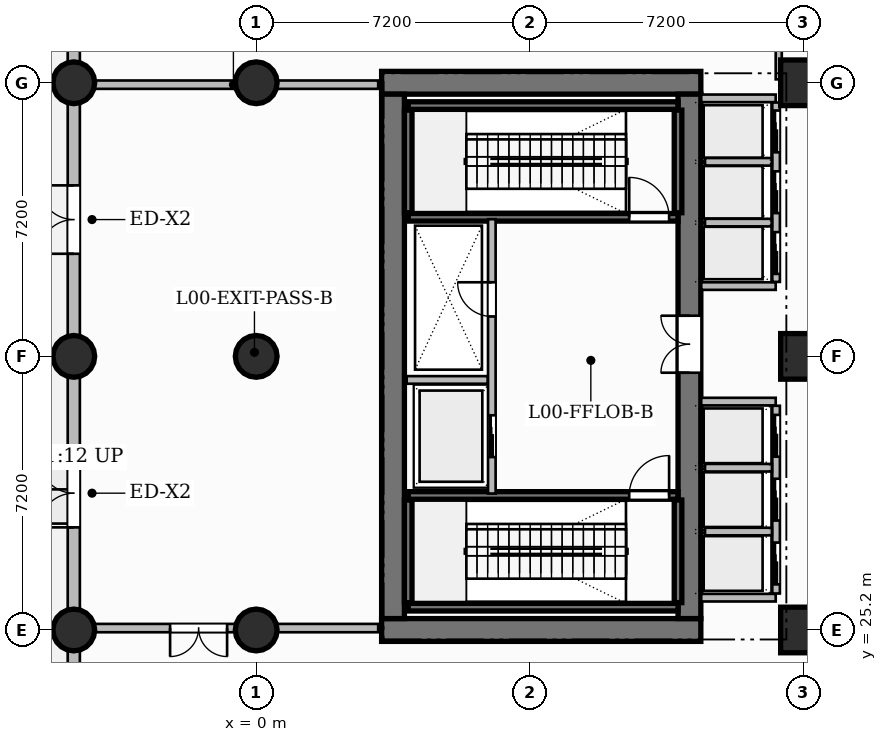
"""IFC4 building model, lengths in metres.
Left out: names, types, materials, properties, quantities, classifications, styles, units other than length and angle.
Written with IfcOpenShell. Run it as: python <this file> out.ifc"""

import sys

from ifc_helpers import new_model, si_unit, direction, frame, frame_2d, origin, origin_2d, place, context, subcontext, project, spatial, rectangle, circle, extrude, source, transform, mapped, element, fill, save


model = new_model("IFC4")
c1 = context("Model", 3, precision=1e-05, world=origin(), true_north=direction((0.0, 1.0)))
c2 = subcontext(c1, "Body", "Model", "MODEL_VIEW")
j1 = project(units=[si_unit("LENGTHUNIT", "METRE"), si_unit("PLANEANGLEUNIT", "RADIAN")], contexts=[c1])
p1 = place(None, origin())
s1 = spatial("IfcSite", under=j1, at=p1, CompositionType="ELEMENT")
p2 = place(p1, origin())
s2 = spatial("IfcBuilding", under=s1, at=p2, CompositionType="ELEMENT")
p3 = place(p2, origin())
s3 = spatial("IfcBuildingStorey", under=s2, at=p3, CompositionType="ELEMENT", Elevation=0.0)
for number, where, z_axis, x_axis in (
    (1, (3.3, 25.2, 0.0), (0.0, 0.0, 1.0), (1.0, 0.0, 0.0)),
    (2, (3.3, 39.6, 0.0), (0.0, 0.0, 1.0), (1.0, 0.0, 0.0)),
):
    element("IfcWall", number, at=place(p3, frame(where, z_axis=z_axis, x_axis=x_axis)), inside=s3, PredefinedType="SHEAR", context=c2, shape_type="SweptSolid", body=[
        extrude(rectangle(XDim=8.4, YDim=0.6, at=frame_2d((4.2, 0.0))), origin(), (0.0, 0.0, 1.0), 5.4),
    ])
p4 = place(p3, frame((3.6, 25.5, 0.0), z_axis=(0.0, 0.0, 1.0), x_axis=(0.0, 1.0, 0.0)))
e3 = element("IfcWall", 3, at=p4, inside=s3, PredefinedType="SHEAR", context=c2, shape_type="SweptSolid", body=[
    extrude(rectangle(XDim=13.8, YDim=0.6, at=frame_2d((6.9, 0.0))), origin(), (0.0, 0.0, 1.0), 5.4),
])
p5 = place(p3, frame((11.4, 25.5, 0.0), z_axis=(0.0, 0.0, 1.0), x_axis=(0.0, 1.0, 0.0)))
e4 = element("IfcWall", 4, at=p5, inside=s3, PredefinedType="SHEAR", context=c2, shape_type="SweptSolid", body=[
    extrude(rectangle(XDim=13.8, YDim=0.6, at=frame_2d((6.9, 0.0))), origin(), (0.0, 0.0, 1.0), 5.4),
])
p6 = place(p5, frame((6.47, 0.0, 0.0)))
e5 = element("IfcOpeningElement", 5, at=p6, cuts=e4, PredefinedType="OPENING", context=c2, shape_type="SweptSolid", body=[
    extrude(rectangle(XDim=1.5, YDim=2.2, at=frame_2d((0.75, 1.1))), frame((0.0, 0.31, 0.0), z_axis=(0.0, -1.0, 0.0), x_axis=(1.0, 0.0, 0.0)), (0.0, 0.0, 1.0), 0.62),
])
m1 = source(origin(), c2, "Body", "SweptSolid", [
    extrude(circle(Radius=0.55, at=origin_2d()), origin(), (0.0, 0.0, 1.0), 5.4),
])
for number, where, z_axis, x_axis in (
    (6, (-4.8, 25.2, 0.0), (0.0, 0.0, 1.0), (1.0, 0.0, 0.0)),
    (7, (-4.8, 32.4, 0.0), (0.0, 0.0, 1.0), (1.0, 0.0, 0.0)),
    (8, (-4.8, 39.6, 0.0), (0.0, 0.0, 1.0), (1.0, 0.0, 0.0)),
    (9, (0.0, 25.2, 0.0), (0.0, 0.0, 1.0), (1.0, 0.0, 0.0)),
    (10, (0.0, 32.4, 0.0), (0.0, 0.0, 1.0), (1.0, 0.0, 0.0)),
    (11, (0.0, 39.6, 0.0), (0.0, 0.0, 1.0), (1.0, 0.0, 0.0)),
):
    element("IfcColumn", number, at=place(p3, frame(where, z_axis=z_axis, x_axis=x_axis)), inside=s3, PredefinedType="COLUMN", context=c2, shape_type="MappedRepresentation", body=[
        mapped(m1, transform((0.0, 0.0, 0.0), scale=1.0)),
    ])
m2 = source(origin(), c2, "Body", "SweptSolid", [
    extrude(rectangle(XDim=1.2, YDim=1.2, at=origin_2d()), origin(), (0.0, 0.0, 1.0), 5.4),
])
for number, where, z_axis, x_axis in (
    (12, (14.4, 25.2, 0.0), (0.0, 0.0, 1.0), (1.0, 0.0, 0.0)),
    (13, (14.4, 32.4, 0.0), (0.0, 0.0, 1.0), (1.0, 0.0, 0.0)),
    (14, (14.4, 39.6, 0.0), (0.0, 0.0, 1.0), (1.0, 0.0, 0.0)),
):
    element("IfcColumn", number, at=place(p3, frame(where, z_axis=z_axis, x_axis=x_axis)), inside=s3, PredefinedType="COLUMN", context=c2, shape_type="MappedRepresentation", body=[
        mapped(m2, transform((0.0, 0.0, 0.0), scale=1.0)),
    ])
p7 = place(p3, frame((4.0, 25.8, 0.0), z_axis=(0.0, 0.0, 1.0), x_axis=(1.0, 0.0, 0.0)))
e15 = element("IfcWall", 15, at=p7, inside=s3, PredefinedType="SHEAR", context=c2, shape_type="SweptSolid", body=[
    extrude(rectangle(XDim=7.1, YDim=0.2, at=frame_2d((3.55, 0.0))), origin(), (0.0, 0.0, 1.0), 5.4),
])
for number, where, z_axis, x_axis in (
    (16, (4.0, 25.92, 0.0), (0.0, 0.0, 1.0), (0.0, 1.0, 0.0)),
    (17, (11.1, 25.92, 0.0), (0.0, 0.0, 1.0), (0.0, 1.0, 0.0)),
):
    element("IfcWall", number, at=place(p3, frame(where, z_axis=z_axis, x_axis=x_axis)), inside=s3, PredefinedType="SHEAR", context=c2, shape_type="SweptSolid", body=[
        extrude(rectangle(XDim=2.7, YDim=0.2, at=frame_2d((1.35, 0.0))), origin(), (0.0, 0.0, 1.0), 5.4),
    ])
p8 = place(p3, frame((4.0, 28.74, 0.0), z_axis=(0.0, 0.0, 1.0), x_axis=(1.0, 0.0, 0.0)))
e18 = element("IfcWall", 18, at=p8, inside=s3, PredefinedType="SHEAR", context=c2, shape_type="SweptSolid", body=[
    extrude(rectangle(XDim=7.1, YDim=0.2, at=frame_2d((3.55, 0.0))), origin(), (0.0, 0.0, 1.0), 5.4),
])
p9 = place(p8, frame((5.815, 0.0, 0.0)))
e19 = element("IfcOpeningElement", 19, at=p9, cuts=e18, PredefinedType="OPENING", context=c2, shape_type="SweptSolid", body=[
    extrude(rectangle(XDim=1.05, YDim=2.2, at=frame_2d((0.525, 1.1))), frame((0.0, 0.11, 0.0), z_axis=(0.0, -1.0, 0.0), x_axis=(1.0, 0.0, 0.0)), (0.0, 0.0, 1.0), 0.22),
])
p10 = place(p3, frame((4.0, 39.0, 0.0), z_axis=(0.0, 0.0, 1.0), x_axis=(1.0, 0.0, 0.0)))
e20 = element("IfcWall", 20, at=p10, inside=s3, PredefinedType="SHEAR", context=c2, shape_type="SweptSolid", body=[
    extrude(rectangle(XDim=7.1, YDim=0.2, at=frame_2d((3.55, 0.0))), origin(), (0.0, 0.0, 1.0), 5.4),
])
for number, where, z_axis, x_axis in (
    (21, (4.0, 36.18, 0.0), (0.0, 0.0, 1.0), (0.0, 1.0, 0.0)),
    (22, (11.1, 36.18, 0.0), (0.0, 0.0, 1.0), (0.0, 1.0, 0.0)),
):
    element("IfcWall", number, at=place(p3, frame(where, z_axis=z_axis, x_axis=x_axis)), inside=s3, PredefinedType="SHEAR", context=c2, shape_type="SweptSolid", body=[
        extrude(rectangle(XDim=2.7, YDim=0.2, at=frame_2d((1.35, 0.0))), origin(), (0.0, 0.0, 1.0), 5.4),
    ])
p11 = place(p3, frame((4.0, 36.06, 0.0), z_axis=(0.0, 0.0, 1.0), x_axis=(1.0, 0.0, 0.0)))
e23 = element("IfcWall", 23, at=p11, inside=s3, PredefinedType="SHEAR", context=c2, shape_type="SweptSolid", body=[
    extrude(rectangle(XDim=7.1, YDim=0.2, at=frame_2d((3.55, 0.0))), origin(), (0.0, 0.0, 1.0), 5.4),
])
p12 = place(p11, frame((5.815, 0.0, 0.0)))
e24 = element("IfcOpeningElement", 24, at=p12, cuts=e23, PredefinedType="OPENING", context=c2, shape_type="SweptSolid", body=[
    extrude(rectangle(XDim=1.05, YDim=2.2, at=frame_2d((0.525, 1.1))), frame((0.0, 0.11, 0.0), z_axis=(0.0, -1.0, 0.0), x_axis=(1.0, 0.0, 0.0)), (0.0, 0.0, 1.0), 0.22),
])
p13 = place(p3, frame((6.2, 28.79, 0.0), z_axis=(0.0, 0.0, 1.0), x_axis=(0.0, 1.0, 0.0)))
e25 = element("IfcWall", 25, at=p13, inside=s3, PredefinedType="PARTITIONING", context=c2, shape_type="SweptSolid", body=[
    extrude(rectangle(XDim=7.22, YDim=0.2, at=frame_2d((3.61, 0.0))), origin(), (0.0, 0.0, 1.0), 5.1),
])
p14 = place(p13, frame((4.66, 0.0, 0.0)))
e26 = element("IfcOpeningElement", 26, at=p14, cuts=e25, PredefinedType="OPENING", context=c2, shape_type="SweptSolid", body=[
    extrude(rectangle(XDim=0.9, YDim=2.1, at=frame_2d((0.45, 1.05))), frame((0.0, 0.11, 0.0), z_axis=(0.0, -1.0, 0.0), x_axis=(1.0, 0.0, 0.0)), (0.0, 0.0, 1.0), 0.22),
])
p15 = place(p13, frame((0.96, 0.0, 0.0)))
e27 = element("IfcOpeningElement", 27, at=p15, cuts=e25, PredefinedType="OPENING", context=c2, shape_type="SweptSolid", body=[
    extrude(rectangle(XDim=1.1, YDim=2.2, at=frame_2d((0.55, 1.1))), frame((0.0, 0.11, 0.0), z_axis=(0.0, -1.0, 0.0), x_axis=(1.0, 0.0, 0.0)), (0.0, 0.0, 1.0), 0.22),
])
p16 = place(p3, frame((3.96, 31.78, 0.0), z_axis=(0.0, 0.0, 1.0), x_axis=(1.0, 0.0, 0.0)))
e28 = element("IfcWall", 28, at=p16, inside=s3, PredefinedType="PARTITIONING", context=c2, shape_type="SweptSolid", body=[
    extrude(rectangle(XDim=2.13, YDim=0.2, at=frame_2d((1.065, 0.0))), origin(), (0.0, 0.0, 1.0), 5.1),
])
for number, where, z_axis, x_axis in (
    (29, (11.71, 26.05, 0.0), (0.0, 0.0, 1.0), (1.0, 0.0, 0.0)),
    (30, (11.71, 31.21, 0.0), (0.0, 0.0, 1.0), (1.0, 0.0, 0.0)),
):
    element("IfcWall", number, at=place(p3, frame(where, z_axis=z_axis, x_axis=x_axis)), inside=s3, PredefinedType="PARTITIONING", context=c2, shape_type="SweptSolid", body=[
        extrude(rectangle(XDim=1.96, YDim=0.2, at=frame_2d((0.98, 0.0))), origin(), (0.0, 0.0, 1.0), 5.1),
    ])
p17 = place(p3, frame((13.68, 26.16, 0.0), z_axis=(0.0, 0.0, 1.0), x_axis=(0.0, 1.0, 0.0)))
e31 = element("IfcWall", 31, at=p17, inside=s3, PredefinedType="PARTITIONING", context=c2, shape_type="SweptSolid", body=[
    extrude(rectangle(XDim=4.94, YDim=0.2, at=frame_2d((2.47, 0.0))), origin(), (0.0, 0.0, 1.0), 5.1),
])
p18 = place(p17, frame((0.24, 0.0, 0.0)))
e32 = element("IfcOpeningElement", 32, at=p18, cuts=e31, PredefinedType="OPENING", context=c2, shape_type="SweptSolid", body=[
    extrude(rectangle(XDim=1.1, YDim=2.2, at=frame_2d((0.55, 1.1))), frame((0.0, 0.11, 0.0), z_axis=(0.0, -1.0, 0.0), x_axis=(1.0, 0.0, 0.0)), (0.0, 0.0, 1.0), 0.22),
])
p19 = place(p17, frame((1.92, 0.0, 0.0)))
e33 = element("IfcOpeningElement", 33, at=p19, cuts=e31, PredefinedType="OPENING", context=c2, shape_type="SweptSolid", body=[
    extrude(rectangle(XDim=1.1, YDim=2.2, at=frame_2d((0.55, 1.1))), frame((0.0, 0.11, 0.0), z_axis=(0.0, -1.0, 0.0), x_axis=(1.0, 0.0, 0.0)), (0.0, 0.0, 1.0), 0.22),
])
p20 = place(p17, frame((3.6, 0.0, 0.0)))
e34 = element("IfcOpeningElement", 34, at=p20, cuts=e31, PredefinedType="OPENING", context=c2, shape_type="SweptSolid", body=[
    extrude(rectangle(XDim=1.1, YDim=2.2, at=frame_2d((0.55, 1.1))), frame((0.0, 0.11, 0.0), z_axis=(0.0, -1.0, 0.0), x_axis=(1.0, 0.0, 0.0)), (0.0, 0.0, 1.0), 0.22),
])
for number, where, z_axis, x_axis in (
    (35, (11.81, 27.79, 0.0), (0.0, 0.0, 1.0), (1.0, 0.0, 0.0)),
    (36, (11.81, 29.47, 0.0), (0.0, 0.0, 1.0), (1.0, 0.0, 0.0)),
):
    element("IfcWall", number, at=place(p3, frame(where, z_axis=z_axis, x_axis=x_axis)), inside=s3, PredefinedType="PARTITIONING", context=c2, shape_type="SweptSolid", body=[
        extrude(rectangle(XDim=1.76, YDim=0.2, at=frame_2d((0.88, 0.0))), origin(), (0.0, 0.0, 1.0), 5.1),
    ])
for number, where, z_axis, x_axis in (
    (37, (11.71, 34.25, 0.0), (0.0, 0.0, 1.0), (1.0, 0.0, 0.0)),
    (38, (11.71, 39.19, 0.0), (0.0, 0.0, 1.0), (1.0, 0.0, 0.0)),
):
    element("IfcWall", number, at=place(p3, frame(where, z_axis=z_axis, x_axis=x_axis)), inside=s3, PredefinedType="PARTITIONING", context=c2, shape_type="SweptSolid", body=[
        extrude(rectangle(XDim=1.96, YDim=0.2, at=frame_2d((0.98, 0.0))), origin(), (0.0, 0.0, 1.0), 5.1),
    ])
p21 = place(p3, frame((13.68, 34.36, 0.0), z_axis=(0.0, 0.0, 1.0), x_axis=(0.0, 1.0, 0.0)))
e39 = element("IfcWall", 39, at=p21, inside=s3, PredefinedType="PARTITIONING", context=c2, shape_type="SweptSolid", body=[
    extrude(rectangle(XDim=4.72, YDim=0.2, at=frame_2d((2.36, 0.0))), origin(), (0.0, 0.0, 1.0), 5.1),
])
p22 = place(p21, frame((0.21, 0.0, 0.0)))
e40 = element("IfcOpeningElement", 40, at=p22, cuts=e39, PredefinedType="OPENING", context=c2, shape_type="SweptSolid", body=[
    extrude(rectangle(XDim=1.1, YDim=2.2, at=frame_2d((0.55, 1.1))), frame((0.0, 0.11, 0.0), z_axis=(0.0, -1.0, 0.0), x_axis=(1.0, 0.0, 0.0)), (0.0, 0.0, 1.0), 0.22),
])
p23 = place(p21, frame((1.81, 0.0, 0.0)))
e41 = element("IfcOpeningElement", 41, at=p23, cuts=e39, PredefinedType="OPENING", context=c2, shape_type="SweptSolid", body=[
    extrude(rectangle(XDim=1.1, YDim=2.2, at=frame_2d((0.55, 1.1))), frame((0.0, 0.11, 0.0), z_axis=(0.0, -1.0, 0.0), x_axis=(1.0, 0.0, 0.0)), (0.0, 0.0, 1.0), 0.22),
])
p24 = place(p21, frame((3.41, 0.0, 0.0)))
e42 = element("IfcOpeningElement", 42, at=p24, cuts=e39, PredefinedType="OPENING", context=c2, shape_type="SweptSolid", body=[
    extrude(rectangle(XDim=1.1, YDim=2.2, at=frame_2d((0.55, 1.1))), frame((0.0, 0.11, 0.0), z_axis=(0.0, -1.0, 0.0), x_axis=(1.0, 0.0, 0.0)), (0.0, 0.0, 1.0), 0.22),
])
for number, where, z_axis, x_axis in (
    (43, (11.81, 35.92, 0.0), (0.0, 0.0, 1.0), (1.0, 0.0, 0.0)),
    (44, (11.81, 37.52, 0.0), (0.0, 0.0, 1.0), (1.0, 0.0, 0.0)),
):
    element("IfcWall", number, at=place(p3, frame(where, z_axis=z_axis, x_axis=x_axis)), inside=s3, PredefinedType="PARTITIONING", context=c2, shape_type="SweptSolid", body=[
        extrude(rectangle(XDim=1.76, YDim=0.2, at=frame_2d((0.88, 0.0))), origin(), (0.0, 0.0, 1.0), 5.1),
    ])
p25 = place(p3, frame((-4.41, 25.25, 0.0), z_axis=(0.0, 0.0, 1.0), x_axis=(1.0, 0.0, 0.0)))
e45 = element("IfcWall", 45, at=p25, inside=s3, PredefinedType="PARTITIONING", context=c2, shape_type="SweptSolid", body=[
    extrude(rectangle(XDim=7.62, YDim=0.22, at=frame_2d((3.81, 0.0))), origin(), (0.0, 0.0, 1.0), 4.085),
])
p26 = place(p25, frame((2.144, 0.0, 0.0)))
e46 = element("IfcOpeningElement", 46, at=p26, cuts=e45, PredefinedType="OPENING", context=c2, shape_type="SweptSolid", body=[
    extrude(rectangle(XDim=1.5, YDim=2.2, at=frame_2d((0.75, 1.1))), frame((0.0, 0.12, 0.0), z_axis=(0.0, -1.0, 0.0), x_axis=(1.0, 0.0, 0.0)), (0.0, 0.0, 1.0), 0.24),
])
p27 = place(p3, frame((-4.41, 39.55, 0.0), z_axis=(0.0, 0.0, 1.0), x_axis=(1.0, 0.0, 0.0)))
e47 = element("IfcWall", 47, at=p27, inside=s3, PredefinedType="PARTITIONING", context=c2, shape_type="SweptSolid", body=[
    extrude(rectangle(XDim=7.62, YDim=0.22, at=frame_2d((3.81, 0.0))), origin(), (0.0, 0.0, 1.0), 4.085),
])
p28 = place(p3, frame((13.84, 39.6, 0.0), z_axis=(0.0, 0.0, 1.0), x_axis=(1.0, 0.0, 0.0)))
e48 = element("IfcWall", 48, at=p28, inside=s3, PredefinedType="PARTITIONING", context=c2, shape_type="SweptSolid", body=[
    extrude(rectangle(XDim=7.92, YDim=0.16, at=frame_2d((3.96, 0.0))), origin(), (0.0, 0.0, 1.0), 4.085),
])
p29 = place(p28, frame((1.22, 0.0, 0.0)))
e49 = element("IfcOpeningElement", 49, at=p29, cuts=e48, PredefinedType="OPENING", context=c2, shape_type="SweptSolid", body=[
    extrude(rectangle(XDim=1.6, YDim=2.4, at=frame_2d((0.8, 1.2))), frame((0.0, 0.09, 0.0), z_axis=(0.0, -1.0, 0.0), x_axis=(1.0, 0.0, 0.0)), (0.0, 0.0, 1.0), 0.18),
])
p30 = place(p3, frame((13.75, 39.69, 0.0), z_axis=(0.0, 0.0, 1.0), x_axis=(0.0, 1.0, 0.0)))
e50 = element("IfcWall", 50, at=p30, inside=s3, PredefinedType="PARTITIONING", context=c2, shape_type="SweptSolid", body=[
    extrude(rectangle(XDim=6.942, YDim=0.16, at=frame_2d((3.471, 0.0))), origin(), (0.0, 0.0, 1.0), 5.1),
])
p31 = place(p30, frame((2.61, 0.0, 0.0)))
e51 = element("IfcOpeningElement", 51, at=p31, cuts=e50, PredefinedType="OPENING", context=c2, shape_type="SweptSolid", body=[
    extrude(rectangle(XDim=1.4, YDim=2.35, at=frame_2d((0.7, 1.175))), frame((0.0, 0.09, 0.0), z_axis=(0.0, -1.0, 0.0), x_axis=(1.0, 0.0, 0.0)), (0.0, 0.0, 1.0), 0.18),
])
p32 = place(p3, frame((-4.8, 0.05, 0.0), z_axis=(0.0, 0.0, 1.0), x_axis=(0.0, 1.0, 0.0)))
e52 = element("IfcWall", 52, at=p32, inside=s3, PredefinedType="SOLIDWALL", context=c2, shape_type="SweptSolid", body=[
    extrude(rectangle(XDim=46.7, YDim=0.32, at=frame_2d((23.35, 0.0))), origin(), (0.0, 0.0, 1.0), 4.085),
])
p33 = place(p32, frame((16.75, 0.0, 0.0)))
e53 = element("IfcOpeningElement", 53, at=p33, cuts=e52, PredefinedType="OPENING", context=c2, shape_type="SweptSolid", body=[
    extrude(rectangle(XDim=2.4, YDim=2.8, at=frame_2d((1.2, 1.4))), frame((0.0, 0.17, 0.0), z_axis=(0.0, -1.0, 0.0), x_axis=(1.0, 0.0, 0.0)), (0.0, 0.0, 1.0), 0.34),
])
p34 = place(p32, frame((27.85, 0.0, 0.0)))
e54 = element("IfcOpeningElement", 54, at=p34, cuts=e52, PredefinedType="OPENING", context=c2, shape_type="SweptSolid", body=[
    extrude(rectangle(XDim=1.8, YDim=2.4, at=frame_2d((0.9, 1.2))), frame((0.0, 0.17, 0.0), z_axis=(0.0, -1.0, 0.0), x_axis=(1.0, 0.0, 0.0)), (0.0, 0.0, 1.0), 0.34),
])
p35 = place(p32, frame((35.05, 0.0, 0.0)))
e55 = element("IfcOpeningElement", 55, at=p35, cuts=e52, PredefinedType="OPENING", context=c2, shape_type="SweptSolid", body=[
    extrude(rectangle(XDim=1.8, YDim=2.4, at=frame_2d((0.9, 1.2))), frame((0.0, 0.17, 0.0), z_axis=(0.0, -1.0, 0.0), x_axis=(1.0, 0.0, 0.0)), (0.0, 0.0, 1.0), 0.34),
])
m3 = source(origin(), c2, "Body", "SweptSolid", [
    extrude(rectangle(XDim=1.05, YDim=2.2, at=frame_2d((0.525, 1.1))), frame((0.0, 0.025, 0.0), z_axis=(0.0, -1.0, 0.0), x_axis=(1.0, 0.0, 0.0)), (0.0, 0.0, 1.0), 0.05),
])
p36 = place(p9, origin())
e56 = element("IfcDoor", 56, at=p36, inside=s3, OperationType="SINGLE_SWING_RIGHT", PredefinedType="DOOR", context=c2, shape_type="MappedRepresentation", body=[
    mapped(m3, transform((0.0, 0.0, 0.0), scale=1.0)),
])
fill(e19, e56)
p37 = place(p12, origin())
e57 = element("IfcDoor", 57, at=p37, inside=s3, OperationType="SINGLE_SWING_LEFT", PredefinedType="DOOR", context=c2, shape_type="MappedRepresentation", body=[
    mapped(m3, transform((0.0, 0.0, 0.0), scale=1.0)),
])
fill(e24, e57)
m4 = source(origin(), c2, "Body", "SweptSolid", [
    extrude(rectangle(XDim=0.9, YDim=2.1, at=frame_2d((0.45, 1.05))), frame((0.0, 0.025, 0.0), z_axis=(0.0, -1.0, 0.0), x_axis=(1.0, 0.0, 0.0)), (0.0, 0.0, 1.0), 0.05),
])
p38 = place(p14, origin())
e58 = element("IfcDoor", 58, at=p38, inside=s3, OperationType="SINGLE_SWING_RIGHT", PredefinedType="DOOR", context=c2, shape_type="MappedRepresentation", body=[
    mapped(m4, transform((0.0, 0.0, 0.0), scale=1.0)),
])
fill(e26, e58)
m5 = source(origin(), c2, "Body", "SweptSolid", [
    extrude(rectangle(XDim=1.5, YDim=2.2, at=frame_2d((0.75, 1.1))), frame((0.0, 0.025, 0.0), z_axis=(0.0, -1.0, 0.0), x_axis=(1.0, 0.0, 0.0)), (0.0, 0.0, 1.0), 0.05),
])
p39 = place(p6, origin())
e59 = element("IfcDoor", 59, at=p39, inside=s3, OperationType="DOUBLE_DOOR_SINGLE_SWING", PredefinedType="DOOR", context=c2, shape_type="MappedRepresentation", body=[
    mapped(m5, transform((0.0, 0.0, 0.0), scale=1.0)),
])
fill(e5, e59)
p40 = place(p26, frame((1.5, 0.0, 0.0), z_axis=(0.0, 0.0, 1.0), x_axis=(-1.0, 0.0, 0.0)))
e60 = element("IfcDoor", 60, at=p40, inside=s3, OperationType="DOUBLE_DOOR_SINGLE_SWING", PredefinedType="DOOR", context=c2, shape_type="MappedRepresentation", body=[
    mapped(m5, transform((0.0, 0.0, 0.0), scale=1.0)),
])
fill(e46, e60)
m6 = source(origin(), c2, "Body", "SweptSolid", [
    extrude(rectangle(XDim=1.1, YDim=2.2, at=frame_2d((0.55, 1.1))), frame((0.0, 0.025, 0.0), z_axis=(0.0, -1.0, 0.0), x_axis=(1.0, 0.0, 0.0)), (0.0, 0.0, 1.0), 0.05),
])
p41 = place(p15, origin())
e61 = element("IfcDoor", 61, at=p41, inside=s3, OperationType="SLIDING_TO_LEFT", PredefinedType="DOOR", context=c2, shape_type="MappedRepresentation", body=[
    mapped(m6, transform((0.0, 0.0, 0.0), scale=1.0)),
])
fill(e27, e61)
p42 = place(p18, origin())
e62 = element("IfcDoor", 62, at=p42, inside=s3, OperationType="SLIDING_TO_LEFT", PredefinedType="DOOR", context=c2, shape_type="MappedRepresentation", body=[
    mapped(m6, transform((0.0, 0.0, 0.0), scale=1.0)),
])
fill(e32, e62)
p43 = place(p19, origin())
e63 = element("IfcDoor", 63, at=p43, inside=s3, OperationType="SLIDING_TO_LEFT", PredefinedType="DOOR", context=c2, shape_type="MappedRepresentation", body=[
    mapped(m6, transform((0.0, 0.0, 0.0), scale=1.0)),
])
fill(e33, e63)
p44 = place(p20, origin())
e64 = element("IfcDoor", 64, at=p44, inside=s3, OperationType="SLIDING_TO_LEFT", PredefinedType="DOOR", context=c2, shape_type="MappedRepresentation", body=[
    mapped(m6, transform((0.0, 0.0, 0.0), scale=1.0)),
])
fill(e34, e64)
p45 = place(p22, origin())
e65 = element("IfcDoor", 65, at=p45, inside=s3, OperationType="SLIDING_TO_LEFT", PredefinedType="DOOR", context=c2, shape_type="MappedRepresentation", body=[
    mapped(m6, transform((0.0, 0.0, 0.0), scale=1.0)),
])
fill(e40, e65)
p46 = place(p23, origin())
e66 = element("IfcDoor", 66, at=p46, inside=s3, OperationType="SLIDING_TO_LEFT", PredefinedType="DOOR", context=c2, shape_type="MappedRepresentation", body=[
    mapped(m6, transform((0.0, 0.0, 0.0), scale=1.0)),
])
fill(e41, e66)
p47 = place(p24, origin())
e67 = element("IfcDoor", 67, at=p47, inside=s3, OperationType="SLIDING_TO_LEFT", PredefinedType="DOOR", context=c2, shape_type="MappedRepresentation", body=[
    mapped(m6, transform((0.0, 0.0, 0.0), scale=1.0)),
])
fill(e42, e67)
m7 = source(origin(), c2, "Body", "SweptSolid", [
    extrude(rectangle(XDim=1.8, YDim=2.4, at=frame_2d((0.9, 1.2))), frame((0.0, 0.025, 0.0), z_axis=(0.0, -1.0, 0.0), x_axis=(1.0, 0.0, 0.0)), (0.0, 0.0, 1.0), 0.05),
])
p48 = place(p34, origin())
e68 = element("IfcDoor", 68, at=p48, inside=s3, OperationType="DOUBLE_DOOR_SINGLE_SWING", PredefinedType="DOOR", context=c2, shape_type="MappedRepresentation", body=[
    mapped(m7, transform((0.0, 0.0, 0.0), scale=1.0)),
])
fill(e54, e68)
p49 = place(p35, origin())
e69 = element("IfcDoor", 69, at=p49, inside=s3, OperationType="DOUBLE_DOOR_SINGLE_SWING", PredefinedType="DOOR", context=c2, shape_type="MappedRepresentation", body=[
    mapped(m7, transform((0.0, 0.0, 0.0), scale=1.0)),
])
fill(e55, e69)
save(model, sys.argv[1])
